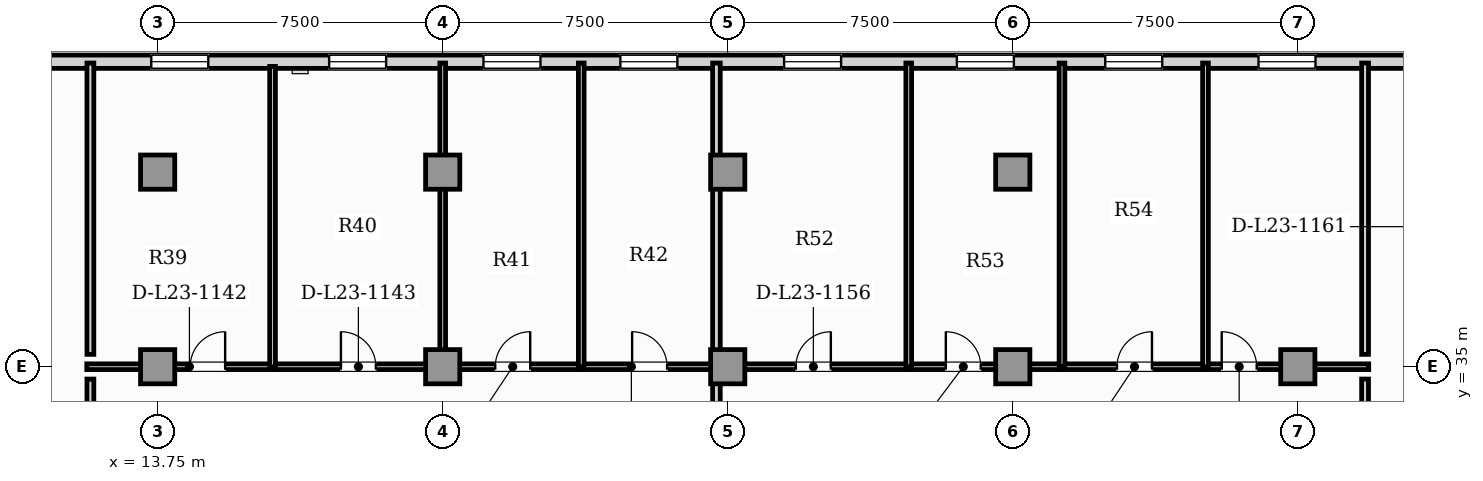
"""IFC4 building model, lengths in metres.
Left out: names, types, materials, properties, quantities, classifications, styles, units other than length and angle.
Written with IfcOpenShell. Run it as: python <this file> out.ifc"""

import sys

from ifc_helpers import new_model, si_unit, direction, frame, frame_2d, origin, origin_2d, place, context, subcontext, project, spatial, rectangle, extrude, element, fill, save


model = new_model("IFC4")
c1 = context("Model", 3, precision=1e-05, world=origin(), true_north=direction((0.0, 1.0)))
c2 = subcontext(c1, "Body", "Model", "MODEL_VIEW")
j1 = project(units=[si_unit("LENGTHUNIT", "METRE"), si_unit("PLANEANGLEUNIT", "RADIAN")], contexts=[c1])
p1 = place(None, origin())
s1 = spatial("IfcSite", under=j1, at=p1, CompositionType="ELEMENT")
p2 = place(p1, origin())
s2 = spatial("IfcBuilding", under=s1, at=p2, CompositionType="ELEMENT")
p3 = place(p2, frame((0.0, 0.0, 96.45)))
s3 = spatial("IfcBuildingStorey", under=s2, at=p3, CompositionType="ELEMENT", Elevation=96.45)
for number, where, z_axis, x_axis in (
    (1, (13.75, 40.12, 0.0), (0.0, 0.0, 1.0), (1.0, 0.0, 0.0)),
    (2, (21.25, 40.12, 0.0), (0.0, 0.0, 1.0), (1.0, 0.0, 0.0)),
    (3, (28.75, 40.12, 0.0), (0.0, 0.0, 1.0), (1.0, 0.0, 0.0)),
    (4, (36.25, 40.12, 0.0), (0.0, 0.0, 1.0), (1.0, 0.0, 0.0)),
    (5, (13.75, 35.0, 0.0), (0.0, 0.0, 1.0), (1.0, 0.0, 0.0)),
    (6, (21.25, 35.0, 0.0), (0.0, 0.0, 1.0), (1.0, 0.0, 0.0)),
    (7, (28.75, 35.0, 0.0), (0.0, 0.0, 1.0), (1.0, 0.0, 0.0)),
    (8, (36.25, 35.0, 0.0), (0.0, 0.0, 1.0), (1.0, 0.0, 0.0)),
    (9, (43.75, 35.0, 0.0), (0.0, 0.0, 1.0), (1.0, 0.0, 0.0)),
):
    element("IfcColumn", number, at=place(p3, frame(where, z_axis=z_axis, x_axis=x_axis)), inside=s3, PredefinedType="COLUMN", context=c2, shape_type="SweptSolid", body=[
        extrude(rectangle(XDim=0.9, YDim=0.9, at=origin_2d()), origin(), (0.0, 0.0, 1.0), 3.85),
    ])
p4 = place(p3, frame((51.66, 43.025, 0.0), z_axis=(0.0, 0.0, 1.0), x_axis=(-1.0, 0.0, 0.0)))
e10 = element("IfcWall", 10, at=p4, inside=s3, PredefinedType="SOLIDWALL", context=c2, shape_type="SweptSolid", body=[
    extrude(rectangle(XDim=45.82, YDim=0.35, at=frame_2d((22.91, 0.0))), origin(), (0.0, 0.0, 1.0), 3.6),
])
p5 = place(p4, frame((42.468, 0.0, 0.9)))
e11 = element("IfcOpeningElement", 11, at=p5, cuts=e10, PredefinedType="OPENING", context=c2, shape_type="SweptSolid", body=[
    extrude(rectangle(XDim=1.5, YDim=1.95, at=frame_2d((0.75, 0.975))), frame((0.0, 0.185, 0.0), z_axis=(0.0, -1.0, 0.0), x_axis=(1.0, 0.0, 0.0)), (0.0, 0.0, 1.0), 0.37),
])
p6 = place(p4, frame((1.853, 0.0, 0.9)))
e12 = element("IfcOpeningElement", 12, at=p6, cuts=e10, PredefinedType="OPENING", context=c2, shape_type="SweptSolid", body=[
    extrude(rectangle(XDim=1.5, YDim=1.95, at=frame_2d((0.75, 0.975))), frame((0.0, 0.185, 0.0), z_axis=(0.0, -1.0, 0.0), x_axis=(1.0, 0.0, 0.0)), (0.0, 0.0, 1.0), 0.37),
])
p7 = place(p4, frame((36.578, 0.0, 0.9)))
e13 = element("IfcOpeningElement", 13, at=p7, cuts=e10, PredefinedType="OPENING", context=c2, shape_type="SweptSolid", body=[
    extrude(rectangle(XDim=1.5, YDim=1.95, at=frame_2d((0.75, 0.975))), frame((0.0, 0.185, 0.0), z_axis=(0.0, -1.0, 0.0), x_axis=(1.0, 0.0, 0.0)), (0.0, 0.0, 1.0), 0.37),
])
p8 = place(p4, frame((31.898, 0.0, 0.9)))
e14 = element("IfcOpeningElement", 14, at=p8, cuts=e10, PredefinedType="OPENING", context=c2, shape_type="SweptSolid", body=[
    extrude(rectangle(XDim=1.5, YDim=1.95, at=frame_2d((0.75, 0.975))), frame((0.0, 0.185, 0.0), z_axis=(0.0, -1.0, 0.0), x_axis=(1.0, 0.0, 0.0)), (0.0, 0.0, 1.0), 0.37),
])
p9 = place(p4, frame((27.837, 0.0, 0.9)))
e15 = element("IfcOpeningElement", 15, at=p9, cuts=e10, PredefinedType="OPENING", context=c2, shape_type="SweptSolid", body=[
    extrude(rectangle(XDim=1.5, YDim=1.95, at=frame_2d((0.75, 0.975))), frame((0.0, 0.185, 0.0), z_axis=(0.0, -1.0, 0.0), x_axis=(1.0, 0.0, 0.0)), (0.0, 0.0, 1.0), 0.37),
])
p10 = place(p4, frame((24.236, 0.0, 0.9)))
e16 = element("IfcOpeningElement", 16, at=p10, cuts=e10, PredefinedType="OPENING", context=c2, shape_type="SweptSolid", body=[
    extrude(rectangle(XDim=1.5, YDim=1.95, at=frame_2d((0.75, 0.975))), frame((0.0, 0.185, 0.0), z_axis=(0.0, -1.0, 0.0), x_axis=(1.0, 0.0, 0.0)), (0.0, 0.0, 1.0), 0.37),
])
p11 = place(p4, frame((19.927, 0.0, 0.9)))
e17 = element("IfcOpeningElement", 17, at=p11, cuts=e10, PredefinedType="OPENING", context=c2, shape_type="SweptSolid", body=[
    extrude(rectangle(XDim=1.5, YDim=1.95, at=frame_2d((0.75, 0.975))), frame((0.0, 0.185, 0.0), z_axis=(0.0, -1.0, 0.0), x_axis=(1.0, 0.0, 0.0)), (0.0, 0.0, 1.0), 0.37),
])
p12 = place(p4, frame((15.381, 0.0, 0.9)))
e18 = element("IfcOpeningElement", 18, at=p12, cuts=e10, PredefinedType="OPENING", context=c2, shape_type="SweptSolid", body=[
    extrude(rectangle(XDim=1.5, YDim=1.95, at=frame_2d((0.75, 0.975))), frame((0.0, 0.185, 0.0), z_axis=(0.0, -1.0, 0.0), x_axis=(1.0, 0.0, 0.0)), (0.0, 0.0, 1.0), 0.37),
])
p13 = place(p4, frame((11.477, 0.0, 0.9)))
e19 = element("IfcOpeningElement", 19, at=p13, cuts=e10, PredefinedType="OPENING", context=c2, shape_type="SweptSolid", body=[
    extrude(rectangle(XDim=1.5, YDim=1.95, at=frame_2d((0.75, 0.975))), frame((0.0, 0.185, 0.0), z_axis=(0.0, -1.0, 0.0), x_axis=(1.0, 0.0, 0.0)), (0.0, 0.0, 1.0), 0.37),
])
p14 = place(p4, frame((7.445, 0.0, 0.9)))
e20 = element("IfcOpeningElement", 20, at=p14, cuts=e10, PredefinedType="OPENING", context=c2, shape_type="SweptSolid", body=[
    extrude(rectangle(XDim=1.5, YDim=1.95, at=frame_2d((0.75, 0.975))), frame((0.0, 0.185, 0.0), z_axis=(0.0, -1.0, 0.0), x_axis=(1.0, 0.0, 0.0)), (0.0, 0.0, 1.0), 0.37),
])
p15 = place(p3, frame((11.885, 35.0, 0.0), z_axis=(0.0, 0.0, 1.0), x_axis=(1.0, 0.0, 0.0)))
e21 = element("IfcWall", 21, at=p15, inside=s3, PredefinedType="PARTITIONING", context=c2, shape_type="SweptSolid", body=[
    extrude(rectangle(XDim=4.893, YDim=0.15, at=frame_2d((2.447, 0.0))), origin(), (0.0, 0.0, 1.0), 2.983),
])
p16 = place(p15, frame((2.721, 0.0, 0.0)))
e22 = element("IfcOpeningElement", 22, at=p16, cuts=e21, PredefinedType="OPENING", context=c2, shape_type="SweptSolid", body=[
    extrude(rectangle(XDim=0.92, YDim=2.1, at=frame_2d((0.46, 1.05))), frame((0.0, 0.085, 0.0), z_axis=(0.0, -1.0, 0.0), x_axis=(1.0, 0.0, 0.0)), (0.0, 0.0, 1.0), 0.17),
])
p17 = place(p3, frame((16.808, 35.0, 0.0), z_axis=(0.0, 0.0, 1.0), x_axis=(1.0, 0.0, 0.0)))
e23 = element("IfcWall", 23, at=p17, inside=s3, PredefinedType="PARTITIONING", context=c2, shape_type="SweptSolid", body=[
    extrude(rectangle(XDim=4.447, YDim=0.15, at=frame_2d((2.223, 0.0))), origin(), (0.0, 0.0, 1.0), 2.983),
])
p18 = place(p17, frame((1.763, 0.0, 0.0)))
e24 = element("IfcOpeningElement", 24, at=p18, cuts=e23, PredefinedType="OPENING", context=c2, shape_type="SweptSolid", body=[
    extrude(rectangle(XDim=0.92, YDim=2.1, at=frame_2d((0.46, 1.05))), frame((0.0, 0.085, 0.0), z_axis=(0.0, -1.0, 0.0), x_axis=(1.0, 0.0, 0.0)), (0.0, 0.0, 1.0), 0.17),
])
p19 = place(p3, frame((21.285, 35.0, 0.0), z_axis=(0.0, 0.0, 1.0), x_axis=(1.0, 0.0, 0.0)))
e25 = element("IfcWall", 25, at=p19, inside=s3, PredefinedType="PARTITIONING", context=c2, shape_type="SweptSolid", body=[
    extrude(rectangle(XDim=3.616, YDim=0.15, at=frame_2d((1.808, 0.0))), origin(), (0.0, 0.0, 1.0), 2.983),
])
p20 = place(p19, frame((1.348, 0.0, 0.0)))
e26 = element("IfcOpeningElement", 26, at=p20, cuts=e25, PredefinedType="OPENING", context=c2, shape_type="SweptSolid", body=[
    extrude(rectangle(XDim=0.92, YDim=2.1, at=frame_2d((0.46, 1.05))), frame((0.0, 0.085, 0.0), z_axis=(0.0, -1.0, 0.0), x_axis=(1.0, 0.0, 0.0)), (0.0, 0.0, 1.0), 0.17),
])
p21 = place(p3, frame((24.931, 35.0, 0.0), z_axis=(0.0, 0.0, 1.0), x_axis=(1.0, 0.0, 0.0)))
e27 = element("IfcWall", 27, at=p21, inside=s3, PredefinedType="PARTITIONING", context=c2, shape_type="SweptSolid", body=[
    extrude(rectangle(XDim=3.527, YDim=0.15, at=frame_2d((1.764, 0.0))), origin(), (0.0, 0.0, 1.0), 2.983),
])
p22 = place(p21, frame((1.304, 0.0, 0.0)))
e28 = element("IfcOpeningElement", 28, at=p22, cuts=e27, PredefinedType="OPENING", context=c2, shape_type="SweptSolid", body=[
    extrude(rectangle(XDim=0.92, YDim=2.1, at=frame_2d((0.46, 1.05))), frame((0.0, 0.085, 0.0), z_axis=(0.0, -1.0, 0.0), x_axis=(1.0, 0.0, 0.0)), (0.0, 0.0, 1.0), 0.17),
])
p23 = place(p3, frame((28.453, 33.495, 0.0), z_axis=(0.0, 0.0, 1.0), x_axis=(0.0, 1.0, 0.0)))
e29 = element("IfcWall", 29, at=p23, inside=s3, PredefinedType="PARTITIONING", context=c2, shape_type="SweptSolid", body=[
    extrude(rectangle(XDim=1.51, YDim=0.2, at=frame_2d((0.755, 0.0))), origin(), (0.0, 0.0, 1.0), 3.6),
])
p24 = place(p3, frame((16.773, 34.995, 0.0), z_axis=(0.0, 0.0, 1.0), x_axis=(0.0, 1.0, 0.0)))
e30 = element("IfcWall", 30, at=p24, inside=s3, PredefinedType="PARTITIONING", context=c2, shape_type="SweptSolid", body=[
    extrude(rectangle(XDim=7.907, YDim=0.15, at=frame_2d((3.954, 0.0))), origin(), (0.0, 0.0, 1.0), 3.6),
])
for number, where, z_axis, x_axis in (
    (31, (21.25, 34.995, 0.0), (0.0, 0.0, 1.0), (0.0, 1.0, 0.0)),
    (32, (24.896, 34.995, 0.0), (0.0, 0.0, 1.0), (0.0, 1.0, 0.0)),
):
    element("IfcWall", number, at=place(p3, frame(where, z_axis=z_axis, x_axis=x_axis)), inside=s3, PredefinedType="PARTITIONING", context=c2, shape_type="SweptSolid", body=[
        extrude(rectangle(XDim=7.995, YDim=0.15, at=frame_2d((3.998, 0.0))), origin(), (0.0, 0.0, 1.0), 3.6),
    ])
p25 = place(p3, frame((28.453, 35.035, 0.0), z_axis=(0.0, 0.0, 1.0), x_axis=(0.0, 1.0, 0.0)))
e33 = element("IfcWall", 33, at=p25, inside=s3, PredefinedType="PARTITIONING", context=c2, shape_type="SweptSolid", body=[
    extrude(rectangle(XDim=7.955, YDim=0.2, at=frame_2d((3.978, 0.0))), origin(), (0.0, 0.0, 1.0), 3.6),
])
p26 = place(p3, frame((28.488, 35.0, 0.0), z_axis=(0.0, 0.0, 1.0), x_axis=(1.0, 0.0, 0.0)))
e34 = element("IfcWall", 34, at=p26, inside=s3, PredefinedType="PARTITIONING", context=c2, shape_type="SweptSolid", body=[
    extrude(rectangle(XDim=5.03, YDim=0.15, at=frame_2d((2.515, 0.0))), origin(), (0.0, 0.0, 1.0), 2.983),
])
p27 = place(p26, frame((2.055, 0.0, 0.0)))
e35 = element("IfcOpeningElement", 35, at=p27, cuts=e34, PredefinedType="OPENING", context=c2, shape_type="SweptSolid", body=[
    extrude(rectangle(XDim=0.92, YDim=2.1, at=frame_2d((0.46, 1.05))), frame((0.0, 0.085, 0.0), z_axis=(0.0, -1.0, 0.0), x_axis=(1.0, 0.0, 0.0)), (0.0, 0.0, 1.0), 0.17),
])
p28 = place(p3, frame((33.548, 35.0, 0.0), z_axis=(0.0, 0.0, 1.0), x_axis=(1.0, 0.0, 0.0)))
e36 = element("IfcWall", 36, at=p28, inside=s3, PredefinedType="PARTITIONING", context=c2, shape_type="SweptSolid", body=[
    extrude(rectangle(XDim=4.002, YDim=0.15, at=frame_2d((2.001, 0.0))), origin(), (0.0, 0.0, 1.0), 2.983),
])
p29 = place(p28, frame((0.941, 0.0, 0.0)))
e37 = element("IfcOpeningElement", 37, at=p29, cuts=e36, PredefinedType="OPENING", context=c2, shape_type="SweptSolid", body=[
    extrude(rectangle(XDim=0.92, YDim=2.1, at=frame_2d((0.46, 1.05))), frame((0.0, 0.085, 0.0), z_axis=(0.0, -1.0, 0.0), x_axis=(1.0, 0.0, 0.0)), (0.0, 0.0, 1.0), 0.17),
])
p30 = place(p3, frame((37.58, 35.0, 0.0), z_axis=(0.0, 0.0, 1.0), x_axis=(1.0, 0.0, 0.0)))
e38 = element("IfcWall", 38, at=p30, inside=s3, PredefinedType="PARTITIONING", context=c2, shape_type="SweptSolid", body=[
    extrude(rectangle(XDim=3.746, YDim=0.15, at=frame_2d((1.873, 0.0))), origin(), (0.0, 0.0, 1.0), 2.983),
])
p31 = place(p30, frame((1.413, 0.0, 0.0)))
e39 = element("IfcOpeningElement", 39, at=p31, cuts=e38, PredefinedType="OPENING", context=c2, shape_type="SweptSolid", body=[
    extrude(rectangle(XDim=0.92, YDim=2.1, at=frame_2d((0.46, 1.05))), frame((0.0, 0.085, 0.0), z_axis=(0.0, -1.0, 0.0), x_axis=(1.0, 0.0, 0.0)), (0.0, 0.0, 1.0), 0.17),
])
p32 = place(p3, frame((41.356, 35.0, 0.0), z_axis=(0.0, 0.0, 1.0), x_axis=(1.0, 0.0, 0.0)))
e40 = element("IfcWall", 40, at=p32, inside=s3, PredefinedType="PARTITIONING", context=c2, shape_type="SweptSolid", body=[
    extrude(rectangle(XDim=4.259, YDim=0.15, at=frame_2d((2.13, 0.0))), origin(), (0.0, 0.0, 1.0), 2.983),
])
p33 = place(p32, frame((0.392, 0.0, 0.0)))
e41 = element("IfcOpeningElement", 41, at=p33, cuts=e40, PredefinedType="OPENING", context=c2, shape_type="SweptSolid", body=[
    extrude(rectangle(XDim=0.92, YDim=2.1, at=frame_2d((0.46, 1.05))), frame((0.0, 0.085, 0.0), z_axis=(0.0, -1.0, 0.0), x_axis=(1.0, 0.0, 0.0)), (0.0, 0.0, 1.0), 0.17),
])
for number, where, z_axis, x_axis in (
    (42, (33.513, 34.995, 0.0), (0.0, 0.0, 1.0), (0.0, 1.0, 0.0)),
    (43, (37.545, 34.995, 0.0), (0.0, 0.0, 1.0), (0.0, 1.0, 0.0)),
    (44, (41.321, 34.995, 0.0), (0.0, 0.0, 1.0), (0.0, 1.0, 0.0)),
):
    element("IfcWall", number, at=place(p3, frame(where, z_axis=z_axis, x_axis=x_axis)), inside=s3, PredefinedType="PARTITIONING", context=c2, shape_type="SweptSolid", body=[
        extrude(rectangle(XDim=7.995, YDim=0.15, at=frame_2d((3.998, 0.0))), origin(), (0.0, 0.0, 1.0), 3.6),
    ])
p34 = place(p3, frame((11.98, 33.495, 0.0), z_axis=(0.0, 0.0, 1.0), x_axis=(0.0, 1.0, 0.0)))
e45 = element("IfcWall", 45, at=p34, inside=s3, PredefinedType="PARTITIONING", context=c2, shape_type="SweptSolid", body=[
    extrude(rectangle(XDim=1.18, YDim=0.18, at=frame_2d((0.59, 0.0))), origin(), (0.0, 0.0, 1.0), 3.6),
])
p35 = place(p3, frame((11.98, 35.325, 0.0), z_axis=(0.0, 0.0, 1.0), x_axis=(0.0, 1.0, 0.0)))
e46 = element("IfcWall", 46, at=p35, inside=s3, PredefinedType="PARTITIONING", context=c2, shape_type="SweptSolid", body=[
    extrude(rectangle(XDim=7.665, YDim=0.18, at=frame_2d((3.833, 0.0))), origin(), (0.0, 0.0, 1.0), 3.6),
])
p36 = place(p3, frame((45.52, 34.675, 0.0), z_axis=(0.0, 0.0, 1.0), x_axis=(0.0, -1.0, 0.0)))
e47 = element("IfcWall", 47, at=p36, inside=s3, PredefinedType="PARTITIONING", context=c2, shape_type="SweptSolid", body=[
    extrude(rectangle(XDim=0.85, YDim=0.18, at=frame_2d((0.425, 0.0))), origin(), (0.0, 0.0, 1.0), 3.6),
])
p37 = place(p3, frame((45.52, 42.99, 0.0), z_axis=(0.0, 0.0, 1.0), x_axis=(0.0, -1.0, 0.0)))
e48 = element("IfcWall", 48, at=p37, inside=s3, PredefinedType="PARTITIONING", context=c2, shape_type="SweptSolid", body=[
    extrude(rectangle(XDim=7.665, YDim=0.18, at=frame_2d((3.833, 0.0))), origin(), (0.0, 0.0, 1.0), 3.6),
])
p38 = place(p7, origin())
e49 = element("IfcWindow", 49, at=p38, inside=s3, PartitioningType="SINGLE_PANEL", PredefinedType="WINDOW", context=c2, shape_type="SweptSolid", body=[
    extrude(rectangle(XDim=1.5, YDim=1.95, at=frame_2d((0.75, 0.975))), frame((0.0, 0.03, 0.0), z_axis=(0.0, -1.0, 0.0), x_axis=(1.0, 0.0, 0.0)), (0.0, 0.0, 1.0), 0.06),
])
fill(e13, e49)
p39 = place(p8, origin())
e50 = element("IfcWindow", 50, at=p39, inside=s3, PartitioningType="SINGLE_PANEL", PredefinedType="WINDOW", context=c2, shape_type="SweptSolid", body=[
    extrude(rectangle(XDim=1.5, YDim=1.95, at=frame_2d((0.75, 0.975))), frame((0.0, 0.03, 0.0), z_axis=(0.0, -1.0, 0.0), x_axis=(1.0, 0.0, 0.0)), (0.0, 0.0, 1.0), 0.06),
])
fill(e14, e50)
p40 = place(p9, origin())
e51 = element("IfcWindow", 51, at=p40, inside=s3, PartitioningType="SINGLE_PANEL", PredefinedType="WINDOW", context=c2, shape_type="SweptSolid", body=[
    extrude(rectangle(XDim=1.5, YDim=1.95, at=frame_2d((0.75, 0.975))), frame((0.0, 0.03, 0.0), z_axis=(0.0, -1.0, 0.0), x_axis=(1.0, 0.0, 0.0)), (0.0, 0.0, 1.0), 0.06),
])
fill(e15, e51)
p41 = place(p10, origin())
e52 = element("IfcWindow", 52, at=p41, inside=s3, PartitioningType="SINGLE_PANEL", PredefinedType="WINDOW", context=c2, shape_type="SweptSolid", body=[
    extrude(rectangle(XDim=1.5, YDim=1.95, at=frame_2d((0.75, 0.975))), frame((0.0, 0.03, 0.0), z_axis=(0.0, -1.0, 0.0), x_axis=(1.0, 0.0, 0.0)), (0.0, 0.0, 1.0), 0.06),
])
fill(e16, e52)
p42 = place(p11, origin())
e53 = element("IfcWindow", 53, at=p42, inside=s3, PartitioningType="SINGLE_PANEL", PredefinedType="WINDOW", context=c2, shape_type="SweptSolid", body=[
    extrude(rectangle(XDim=1.5, YDim=1.95, at=frame_2d((0.75, 0.975))), frame((0.0, 0.03, 0.0), z_axis=(0.0, -1.0, 0.0), x_axis=(1.0, 0.0, 0.0)), (0.0, 0.0, 1.0), 0.06),
])
fill(e17, e53)
p43 = place(p12, origin())
e54 = element("IfcWindow", 54, at=p43, inside=s3, PartitioningType="SINGLE_PANEL", PredefinedType="WINDOW", context=c2, shape_type="SweptSolid", body=[
    extrude(rectangle(XDim=1.5, YDim=1.95, at=frame_2d((0.75, 0.975))), frame((0.0, 0.03, 0.0), z_axis=(0.0, -1.0, 0.0), x_axis=(1.0, 0.0, 0.0)), (0.0, 0.0, 1.0), 0.06),
])
fill(e18, e54)
p44 = place(p13, origin())
e55 = element("IfcWindow", 55, at=p44, inside=s3, PartitioningType="SINGLE_PANEL", PredefinedType="WINDOW", context=c2, shape_type="SweptSolid", body=[
    extrude(rectangle(XDim=1.5, YDim=1.95, at=frame_2d((0.75, 0.975))), frame((0.0, 0.03, 0.0), z_axis=(0.0, -1.0, 0.0), x_axis=(1.0, 0.0, 0.0)), (0.0, 0.0, 1.0), 0.06),
])
fill(e19, e55)
p45 = place(p14, origin())
e56 = element("IfcWindow", 56, at=p45, inside=s3, PartitioningType="SINGLE_PANEL", PredefinedType="WINDOW", context=c2, shape_type="SweptSolid", body=[
    extrude(rectangle(XDim=1.5, YDim=1.95, at=frame_2d((0.75, 0.975))), frame((0.0, 0.03, 0.0), z_axis=(0.0, -1.0, 0.0), x_axis=(1.0, 0.0, 0.0)), (0.0, 0.0, 1.0), 0.06),
])
fill(e20, e56)
p46 = place(p16, origin())
e57 = element("IfcDoor", 57, at=p46, inside=s3, OperationType="SINGLE_SWING_RIGHT", PredefinedType="DOOR", context=c2, shape_type="SweptSolid", body=[
    extrude(rectangle(XDim=0.92, YDim=2.1, at=frame_2d((0.46, 1.05))), frame((0.0, 0.025, 0.0), z_axis=(0.0, -1.0, 0.0), x_axis=(1.0, 0.0, 0.0)), (0.0, 0.0, 1.0), 0.05),
])
fill(e22, e57)
p47 = place(p18, origin())
e58 = element("IfcDoor", 58, at=p47, inside=s3, OperationType="SINGLE_SWING_LEFT", PredefinedType="DOOR", context=c2, shape_type="SweptSolid", body=[
    extrude(rectangle(XDim=0.92, YDim=2.1, at=frame_2d((0.46, 1.05))), frame((0.0, 0.025, 0.0), z_axis=(0.0, -1.0, 0.0), x_axis=(1.0, 0.0, 0.0)), (0.0, 0.0, 1.0), 0.05),
])
fill(e24, e58)
p48 = place(p20, origin())
e59 = element("IfcDoor", 59, at=p48, inside=s3, OperationType="SINGLE_SWING_RIGHT", PredefinedType="DOOR", context=c2, shape_type="SweptSolid", body=[
    extrude(rectangle(XDim=0.92, YDim=2.1, at=frame_2d((0.46, 1.05))), frame((0.0, 0.025, 0.0), z_axis=(0.0, -1.0, 0.0), x_axis=(1.0, 0.0, 0.0)), (0.0, 0.0, 1.0), 0.05),
])
fill(e26, e59)
p49 = place(p22, origin())
e60 = element("IfcDoor", 60, at=p49, inside=s3, OperationType="SINGLE_SWING_LEFT", PredefinedType="DOOR", context=c2, shape_type="SweptSolid", body=[
    extrude(rectangle(XDim=0.92, YDim=2.1, at=frame_2d((0.46, 1.05))), frame((0.0, 0.025, 0.0), z_axis=(0.0, -1.0, 0.0), x_axis=(1.0, 0.0, 0.0)), (0.0, 0.0, 1.0), 0.05),
])
fill(e28, e60)
p50 = place(p27, origin())
e61 = element("IfcDoor", 61, at=p50, inside=s3, OperationType="SINGLE_SWING_RIGHT", PredefinedType="DOOR", context=c2, shape_type="SweptSolid", body=[
    extrude(rectangle(XDim=0.92, YDim=2.1, at=frame_2d((0.46, 1.05))), frame((0.0, 0.025, 0.0), z_axis=(0.0, -1.0, 0.0), x_axis=(1.0, 0.0, 0.0)), (0.0, 0.0, 1.0), 0.05),
])
fill(e35, e61)
p51 = place(p29, origin())
e62 = element("IfcDoor", 62, at=p51, inside=s3, OperationType="SINGLE_SWING_LEFT", PredefinedType="DOOR", context=c2, shape_type="SweptSolid", body=[
    extrude(rectangle(XDim=0.92, YDim=2.1, at=frame_2d((0.46, 1.05))), frame((0.0, 0.025, 0.0), z_axis=(0.0, -1.0, 0.0), x_axis=(1.0, 0.0, 0.0)), (0.0, 0.0, 1.0), 0.05),
])
fill(e37, e62)
p52 = place(p31, origin())
e63 = element("IfcDoor", 63, at=p52, inside=s3, OperationType="SINGLE_SWING_RIGHT", PredefinedType="DOOR", context=c2, shape_type="SweptSolid", body=[
    extrude(rectangle(XDim=0.92, YDim=2.1, at=frame_2d((0.46, 1.05))), frame((0.0, 0.025, 0.0), z_axis=(0.0, -1.0, 0.0), x_axis=(1.0, 0.0, 0.0)), (0.0, 0.0, 1.0), 0.05),
])
fill(e39, e63)
p53 = place(p33, origin())
e64 = element("IfcDoor", 64, at=p53, inside=s3, OperationType="SINGLE_SWING_LEFT", PredefinedType="DOOR", context=c2, shape_type="SweptSolid", body=[
    extrude(rectangle(XDim=0.92, YDim=2.1, at=frame_2d((0.46, 1.05))), frame((0.0, 0.025, 0.0), z_axis=(0.0, -1.0, 0.0), x_axis=(1.0, 0.0, 0.0)), (0.0, 0.0, 1.0), 0.05),
])
fill(e41, e64)
save(model, sys.argv[1])
